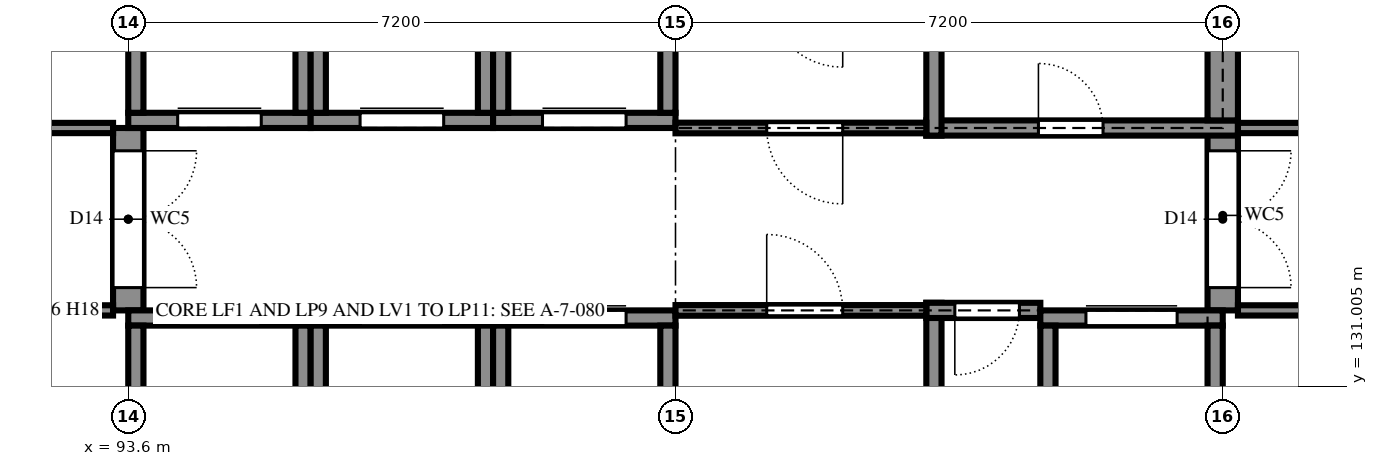
"""IFC4 building model, lengths in metres.
Left out: names, types, materials, properties, quantities, classifications, styles, units other than length and angle.
Written with IfcOpenShell. Run it as: python <this file> out.ifc"""

import sys

from ifc_helpers import new_model, si_unit, direction, frame, frame_2d, origin, place, context, subcontext, project, spatial, rectangle, extrude, element, fill, save


model = new_model("IFC4")
c1 = context("Model", 3, precision=1e-05, world=origin(), true_north=direction((0.0, 1.0)))
c2 = subcontext(c1, "Body", "Model", "MODEL_VIEW")
j1 = project(units=[si_unit("LENGTHUNIT", "METRE"), si_unit("PLANEANGLEUNIT", "RADIAN")], contexts=[c1])
p1 = place(None, origin())
s1 = spatial("IfcSite", under=j1, at=p1, CompositionType="ELEMENT")
p2 = place(p1, origin())
s2 = spatial("IfcBuilding", under=s1, at=p2, CompositionType="ELEMENT")
p3 = place(p2, frame((0.0, 0.0, 10.8)))
s3 = spatial("IfcBuildingStorey", under=s2, at=p3, CompositionType="ELEMENT", Elevation=10.8)
p4 = place(p3, frame((93.6, 132.0, 0.0), z_axis=(0.0, 0.0, 1.0), x_axis=(0.0, 1.0, 0.0)))
e1 = element("IfcWall", 1, at=p4, inside=s3, PredefinedType="SHEAR", context=c2, shape_type="SweptSolid", body=[
    extrude(rectangle(XDim=2.4, YDim=0.4, at=frame_2d((1.2, 0.0))), origin(), (0.0, 0.0, 1.0), 3.6),
])
p5 = place(p4, frame((0.3, 0.0, 0.0)))
e2 = element("IfcOpeningElement", 2, at=p5, cuts=e1, PredefinedType="OPENING", context=c2, shape_type="SweptSolid", body=[
    extrude(rectangle(XDim=1.8, YDim=2.1, at=frame_2d((0.9, 1.05))), frame((0.0, 0.21, 0.0), z_axis=(0.0, -1.0, 0.0), x_axis=(1.0, 0.0, 0.0)), (0.0, 0.0, 1.0), 0.42),
])
p6 = place(p3, frame((104.2, 132.1, 0.0), z_axis=(0.0, 0.0, 1.0), x_axis=(0.0, -1.0, 0.0)))
e3 = element("IfcWall", 3, at=p6, inside=s3, PredefinedType="SHEAR", context=c2, shape_type="SweptSolid", body=[
    extrude(rectangle(XDim=3.525, YDim=0.2, at=frame_2d((1.763, 0.0))), origin(), (0.0, 0.0, 1.0), 3.6),
])
p7 = place(p3, frame((105.6, 132.0, 0.0), z_axis=(0.0, 0.0, 1.0), x_axis=(-1.0, 0.0, 0.0)))
e4 = element("IfcWall", 4, at=p7, inside=s3, PredefinedType="SHEAR", context=c2, shape_type="SweptSolid", body=[
    extrude(rectangle(XDim=1.5, YDim=0.2, at=frame_2d((0.75, 0.0))), origin(), (0.0, 0.0, 1.0), 3.6),
])
p8 = place(p7, frame((0.275, 0.0, 0.0)))
e5 = element("IfcOpeningElement", 5, at=p8, cuts=e4, PredefinedType="OPENING", context=c2, shape_type="SweptSolid", body=[
    extrude(rectangle(XDim=0.85, YDim=2.1, at=frame_2d((0.425, 1.05))), frame((0.0, 0.11, 0.0), z_axis=(0.0, -1.0, 0.0), x_axis=(1.0, 0.0, 0.0)), (0.0, 0.0, 1.0), 0.22),
])
p9 = place(p3, frame((108.0, 132.0, 0.0), z_axis=(0.0, 0.0, 1.0), x_axis=(0.0, 1.0, 0.0)))
e6 = element("IfcWall", 6, at=p9, inside=s3, PredefinedType="SHEAR", context=c2, shape_type="SweptSolid", body=[
    extrude(rectangle(XDim=2.5, YDim=0.4, at=frame_2d((1.25, 0.0))), origin(), (0.0, 0.0, 1.0), 3.6),
])
p10 = place(p9, frame((0.3, 0.0, 0.0)))
e7 = element("IfcOpeningElement", 7, at=p10, cuts=e6, PredefinedType="OPENING", context=c2, shape_type="SweptSolid", body=[
    extrude(rectangle(XDim=1.8, YDim=2.1, at=frame_2d((0.9, 1.05))), frame((0.0, 0.21, 0.0), z_axis=(0.0, -1.0, 0.0), x_axis=(1.0, 0.0, 0.0)), (0.0, 0.0, 1.0), 0.42),
])
p11 = place(p3, frame((104.1, 134.4, 0.0), z_axis=(0.0, 0.0, 1.0), x_axis=(1.0, 0.0, 0.0)))
e8 = element("IfcWall", 8, at=p11, inside=s3, PredefinedType="SHEAR", context=c2, shape_type="SweptSolid", body=[
    extrude(rectangle(XDim=4.1, YDim=0.2, at=frame_2d((2.05, 0.0))), origin(), (0.0, 0.0, 1.0), 3.6),
])
p12 = place(p11, frame((1.475, 0.0, 0.0)))
e9 = element("IfcOpeningElement", 9, at=p12, cuts=e8, PredefinedType="OPENING", context=c2, shape_type="SweptSolid", body=[
    extrude(rectangle(XDim=0.85, YDim=2.1, at=frame_2d((0.425, 1.05))), frame((0.0, 0.11, 0.0), z_axis=(0.0, -1.0, 0.0), x_axis=(1.0, 0.0, 0.0)), (0.0, 0.0, 1.0), 0.22),
])
p13 = place(p3, frame((108.0, 134.5, 0.0), z_axis=(0.0, 0.0, 1.0), x_axis=(0.0, 1.0, 0.0)))
e10 = element("IfcWall", 10, at=p13, inside=s3, PredefinedType="SHEAR", context=c2, shape_type="SweptSolid", body=[
    extrude(rectangle(XDim=2.9, YDim=0.4, at=frame_2d((1.45, 0.0))), origin(), (0.0, 0.0, 1.0), 3.6),
])
p14 = place(p3, frame((104.2, 137.4, 0.0), z_axis=(0.0, 0.0, 1.0), x_axis=(0.0, -1.0, 0.0)))
e11 = element("IfcWall", 11, at=p14, inside=s3, PredefinedType="SHEAR", context=c2, shape_type="SweptSolid", body=[
    extrude(rectangle(XDim=3.1, YDim=0.2, at=frame_2d((1.55, 0.0))), origin(), (0.0, 0.0, 1.0), 3.6),
])
p15 = place(p3, frame((93.6, 131.9, 0.0), z_axis=(0.0, 0.0, 1.0), x_axis=(1.0, 0.0, 0.0)))
e12 = element("IfcWall", 12, at=p15, inside=s3, PredefinedType="SHEAR", context=c2, shape_type="SweptSolid", body=[
    extrude(rectangle(XDim=2.4, YDim=0.2, at=frame_2d((1.2, 0.0))), origin(), (0.0, 0.0, 1.0), 3.6),
])
p16 = place(p15, frame((0.65, 0.0, 0.0)))
e13 = element("IfcOpeningElement", 13, at=p16, cuts=e12, PredefinedType="OPENING", context=c2, shape_type="SweptSolid", body=[
    extrude(rectangle(XDim=1.1, YDim=2.1, at=frame_2d((0.55, 1.05))), frame((0.0, 0.11, 0.0), z_axis=(0.0, -1.0, 0.0), x_axis=(1.0, 0.0, 0.0)), (0.0, 0.0, 1.0), 0.22),
])
for number, where, z_axis, x_axis in (
    (14, (93.7, 129.6, 0.0), (0.0, 0.0, 1.0), (0.0, 1.0, 0.0)),
    (15, (95.9, 129.6, 0.0), (0.0, 0.0, 1.0), (0.0, 1.0, 0.0)),
):
    element("IfcWall", number, at=place(p3, frame(where, z_axis=z_axis, x_axis=x_axis)), inside=s3, PredefinedType="SHEAR", context=c2, shape_type="SweptSolid", body=[
        extrude(rectangle(XDim=2.2, YDim=0.2, at=frame_2d((1.1, 0.0))), origin(), (0.0, 0.0, 1.0), 3.6),
    ])
p17 = place(p3, frame((96.0, 131.9, 0.0), z_axis=(0.0, 0.0, 1.0), x_axis=(1.0, 0.0, 0.0)))
e16 = element("IfcWall", 16, at=p17, inside=s3, PredefinedType="SHEAR", context=c2, shape_type="SweptSolid", body=[
    extrude(rectangle(XDim=2.4, YDim=0.2, at=frame_2d((1.2, 0.0))), origin(), (0.0, 0.0, 1.0), 3.6),
])
p18 = place(p17, frame((0.65, 0.0, 0.0)))
e17 = element("IfcOpeningElement", 17, at=p18, cuts=e16, PredefinedType="OPENING", context=c2, shape_type="SweptSolid", body=[
    extrude(rectangle(XDim=1.1, YDim=2.1, at=frame_2d((0.55, 1.05))), frame((0.0, 0.11, 0.0), z_axis=(0.0, -1.0, 0.0), x_axis=(1.0, 0.0, 0.0)), (0.0, 0.0, 1.0), 0.22),
])
for number, where, z_axis, x_axis in (
    (18, (96.1, 129.6, 0.0), (0.0, 0.0, 1.0), (0.0, 1.0, 0.0)),
    (19, (98.3, 129.6, 0.0), (0.0, 0.0, 1.0), (0.0, 1.0, 0.0)),
):
    element("IfcWall", number, at=place(p3, frame(where, z_axis=z_axis, x_axis=x_axis)), inside=s3, PredefinedType="SHEAR", context=c2, shape_type="SweptSolid", body=[
        extrude(rectangle(XDim=2.2, YDim=0.2, at=frame_2d((1.1, 0.0))), origin(), (0.0, 0.0, 1.0), 3.6),
    ])
p19 = place(p3, frame((98.4, 131.9, 0.0), z_axis=(0.0, 0.0, 1.0), x_axis=(1.0, 0.0, 0.0)))
e20 = element("IfcWall", 20, at=p19, inside=s3, PredefinedType="SHEAR", context=c2, shape_type="SweptSolid", body=[
    extrude(rectangle(XDim=2.4, YDim=0.2, at=frame_2d((1.2, 0.0))), origin(), (0.0, 0.0, 1.0), 3.6),
])
p20 = place(p19, frame((0.65, 0.0, 0.0)))
e21 = element("IfcOpeningElement", 21, at=p20, cuts=e20, PredefinedType="OPENING", context=c2, shape_type="SweptSolid", body=[
    extrude(rectangle(XDim=1.1, YDim=2.1, at=frame_2d((0.55, 1.05))), frame((0.0, 0.11, 0.0), z_axis=(0.0, -1.0, 0.0), x_axis=(1.0, 0.0, 0.0)), (0.0, 0.0, 1.0), 0.22),
])
for number, where, z_axis, x_axis in (
    (22, (98.5, 129.6, 0.0), (0.0, 0.0, 1.0), (0.0, 1.0, 0.0)),
    (23, (100.7, 129.6, 0.0), (0.0, 0.0, 1.0), (0.0, 1.0, 0.0)),
):
    element("IfcWall", number, at=place(p3, frame(where, z_axis=z_axis, x_axis=x_axis)), inside=s3, PredefinedType="SHEAR", context=c2, shape_type="SweptSolid", body=[
        extrude(rectangle(XDim=2.2, YDim=0.2, at=frame_2d((1.1, 0.0))), origin(), (0.0, 0.0, 1.0), 3.6),
    ])
p21 = place(p3, frame((93.6, 134.5, 0.0), z_axis=(0.0, 0.0, 1.0), x_axis=(1.0, 0.0, 0.0)))
e24 = element("IfcWall", 24, at=p21, inside=s3, PredefinedType="SHEAR", context=c2, shape_type="SweptSolid", body=[
    extrude(rectangle(XDim=2.4, YDim=0.2, at=frame_2d((1.2, 0.0))), origin(), (0.0, 0.0, 1.0), 3.6),
])
p22 = place(p21, frame((0.65, 0.0, 0.0)))
e25 = element("IfcOpeningElement", 25, at=p22, cuts=e24, PredefinedType="OPENING", context=c2, shape_type="SweptSolid", body=[
    extrude(rectangle(XDim=1.1, YDim=2.1, at=frame_2d((0.55, 1.05))), frame((0.0, 0.11, 0.0), z_axis=(0.0, -1.0, 0.0), x_axis=(1.0, 0.0, 0.0)), (0.0, 0.0, 1.0), 0.22),
])
for number, where, z_axis, x_axis in (
    (26, (93.7, 134.6, 0.0), (0.0, 0.0, 1.0), (0.0, 1.0, 0.0)),
    (27, (95.9, 134.6, 0.0), (0.0, 0.0, 1.0), (0.0, 1.0, 0.0)),
):
    element("IfcWall", number, at=place(p3, frame(where, z_axis=z_axis, x_axis=x_axis)), inside=s3, PredefinedType="SHEAR", context=c2, shape_type="SweptSolid", body=[
        extrude(rectangle(XDim=2.2, YDim=0.2, at=frame_2d((1.1, 0.0))), origin(), (0.0, 0.0, 1.0), 3.6),
    ])
p23 = place(p3, frame((96.0, 134.5, 0.0), z_axis=(0.0, 0.0, 1.0), x_axis=(1.0, 0.0, 0.0)))
e28 = element("IfcWall", 28, at=p23, inside=s3, PredefinedType="SHEAR", context=c2, shape_type="SweptSolid", body=[
    extrude(rectangle(XDim=2.4, YDim=0.2, at=frame_2d((1.2, 0.0))), origin(), (0.0, 0.0, 1.0), 3.6),
])
p24 = place(p23, frame((0.65, 0.0, 0.0)))
e29 = element("IfcOpeningElement", 29, at=p24, cuts=e28, PredefinedType="OPENING", context=c2, shape_type="SweptSolid", body=[
    extrude(rectangle(XDim=1.1, YDim=2.1, at=frame_2d((0.55, 1.05))), frame((0.0, 0.11, 0.0), z_axis=(0.0, -1.0, 0.0), x_axis=(1.0, 0.0, 0.0)), (0.0, 0.0, 1.0), 0.22),
])
for number, where, z_axis, x_axis in (
    (30, (96.1, 134.6, 0.0), (0.0, 0.0, 1.0), (0.0, 1.0, 0.0)),
    (31, (98.3, 134.6, 0.0), (0.0, 0.0, 1.0), (0.0, 1.0, 0.0)),
):
    element("IfcWall", number, at=place(p3, frame(where, z_axis=z_axis, x_axis=x_axis)), inside=s3, PredefinedType="SHEAR", context=c2, shape_type="SweptSolid", body=[
        extrude(rectangle(XDim=2.2, YDim=0.2, at=frame_2d((1.1, 0.0))), origin(), (0.0, 0.0, 1.0), 3.6),
    ])
p25 = place(p3, frame((98.4, 134.5, 0.0), z_axis=(0.0, 0.0, 1.0), x_axis=(1.0, 0.0, 0.0)))
e32 = element("IfcWall", 32, at=p25, inside=s3, PredefinedType="SHEAR", context=c2, shape_type="SweptSolid", body=[
    extrude(rectangle(XDim=2.4, YDim=0.2, at=frame_2d((1.2, 0.0))), origin(), (0.0, 0.0, 1.0), 3.6),
])
p26 = place(p25, frame((0.65, 0.0, 0.0)))
e33 = element("IfcOpeningElement", 33, at=p26, cuts=e32, PredefinedType="OPENING", context=c2, shape_type="SweptSolid", body=[
    extrude(rectangle(XDim=1.1, YDim=2.1, at=frame_2d((0.55, 1.05))), frame((0.0, 0.11, 0.0), z_axis=(0.0, -1.0, 0.0), x_axis=(1.0, 0.0, 0.0)), (0.0, 0.0, 1.0), 0.22),
])
for number, where, z_axis, x_axis in (
    (34, (98.5, 134.6, 0.0), (0.0, 0.0, 1.0), (0.0, 1.0, 0.0)),
    (35, (100.7, 134.6, 0.0), (0.0, 0.0, 1.0), (0.0, 1.0, 0.0)),
):
    element("IfcWall", number, at=place(p3, frame(where, z_axis=z_axis, x_axis=x_axis)), inside=s3, PredefinedType="SHEAR", context=c2, shape_type="SweptSolid", body=[
        extrude(rectangle(XDim=2.2, YDim=0.2, at=frame_2d((1.1, 0.0))), origin(), (0.0, 0.0, 1.0), 3.6),
    ])
p27 = place(p3, frame((105.6, 131.9, 0.0), z_axis=(0.0, 0.0, 1.0), x_axis=(1.0, 0.0, 0.0)))
e36 = element("IfcWall", 36, at=p27, inside=s3, PredefinedType="SHEAR", context=c2, shape_type="SweptSolid", body=[
    extrude(rectangle(XDim=2.4, YDim=0.2, at=frame_2d((1.2, 0.0))), origin(), (0.0, 0.0, 1.0), 3.6),
])
p28 = place(p27, frame((0.6, 0.0, 0.0)))
e37 = element("IfcOpeningElement", 37, at=p28, cuts=e36, PredefinedType="OPENING", context=c2, shape_type="SweptSolid", body=[
    extrude(rectangle(XDim=1.2, YDim=2.1, at=frame_2d((0.6, 1.05))), frame((0.0, 0.11, 0.0), z_axis=(0.0, -1.0, 0.0), x_axis=(1.0, 0.0, 0.0)), (0.0, 0.0, 1.0), 0.22),
])
for number, where, z_axis, x_axis in (
    (38, (105.7, 129.3, 0.0), (0.0, 0.0, 1.0), (0.0, 1.0, 0.0)),
    (39, (107.9, 129.3, 0.0), (0.0, 0.0, 1.0), (0.0, 1.0, 0.0)),
):
    element("IfcWall", number, at=place(p3, frame(where, z_axis=z_axis, x_axis=x_axis)), inside=s3, PredefinedType="SHEAR", context=c2, shape_type="SweptSolid", body=[
        extrude(rectangle(XDim=2.5, YDim=0.2, at=frame_2d((1.25, 0.0))), origin(), (0.0, 0.0, 1.0), 3.6),
    ])
p29 = place(p3, frame((92.143, 132.0, 0.0), z_axis=(0.0, 0.0, 1.0), x_axis=(1.0, 0.0, 0.0)))
e40 = element("IfcWall", 40, at=p29, inside=s3, PredefinedType="PARTITIONING", context=c2, shape_type="SweptSolid", body=[
    extrude(rectangle(XDim=1.257, YDim=0.135, at=frame_2d((0.629, 0.0))), origin(), (0.0, 0.0, 1.0), 3.159),
])
p30 = place(p3, frame((100.8, 132.0, 0.0), z_axis=(0.0, 0.0, 1.0), x_axis=(1.0, 0.0, 0.0)))
e41 = element("IfcWall", 41, at=p30, inside=s3, PredefinedType="PARTITIONING", context=c2, shape_type="SweptSolid", body=[
    extrude(rectangle(XDim=3.3, YDim=0.14, at=frame_2d((1.65, 0.0))), origin(), (0.0, 0.0, 1.0), 3.42),
])
p31 = place(p30, frame((1.2, 0.0, 0.0)))
e42 = element("IfcOpeningElement", 42, at=p31, cuts=e41, PredefinedType="OPENING", context=c2, shape_type="SweptSolid", body=[
    extrude(rectangle(XDim=1.0, YDim=2.1, at=frame_2d((0.5, 1.05))), frame((0.0, 0.08, 0.0), z_axis=(0.0, -1.0, 0.0), x_axis=(1.0, 0.0, 0.0)), (0.0, 0.0, 1.0), 0.16),
])
p32 = place(p3, frame((108.2, 132.0, 0.0), z_axis=(0.0, 0.0, 1.0), x_axis=(1.0, 0.0, 0.0)))
e43 = element("IfcWall", 43, at=p32, inside=s3, PredefinedType="PARTITIONING", context=c2, shape_type="SweptSolid", body=[
    extrude(rectangle(XDim=28.41, YDim=0.135, at=frame_2d((14.205, 0.0))), origin(), (0.0, 0.0, 1.0), 3.159),
])
p33 = place(p32, frame((26.375, 0.0, 0.0)))
e44 = element("IfcOpeningElement", 44, at=p33, cuts=e43, PredefinedType="OPENING", context=c2, shape_type="SweptSolid", body=[
    extrude(rectangle(XDim=0.85, YDim=2.1, at=frame_2d((0.425, 1.05))), frame((0.0, 0.077, 0.0), z_axis=(0.0, -1.0, 0.0), x_axis=(1.0, 0.0, 0.0)), (0.0, 0.0, 1.0), 0.155),
])
p34 = place(p32, frame((2.9, 0.0, 0.0)))
e45 = element("IfcOpeningElement", 45, at=p34, cuts=e43, PredefinedType="OPENING", context=c2, shape_type="SweptSolid", body=[
    extrude(rectangle(XDim=1.0, YDim=2.4, at=frame_2d((0.5, 1.2))), frame((0.0, 0.077, 0.0), z_axis=(0.0, -1.0, 0.0), x_axis=(1.0, 0.0, 0.0)), (0.0, 0.0, 1.0), 0.155),
])
p35 = place(p32, frame((10.1, 0.0, 0.0)))
e46 = element("IfcOpeningElement", 46, at=p35, cuts=e43, PredefinedType="OPENING", context=c2, shape_type="SweptSolid", body=[
    extrude(rectangle(XDim=1.0, YDim=2.4, at=frame_2d((0.5, 1.2))), frame((0.0, 0.077, 0.0), z_axis=(0.0, -1.0, 0.0), x_axis=(1.0, 0.0, 0.0)), (0.0, 0.0, 1.0), 0.155),
])
p36 = place(p32, frame((19.1, 0.0, 0.0)))
e47 = element("IfcOpeningElement", 47, at=p36, cuts=e43, PredefinedType="OPENING", context=c2, shape_type="SweptSolid", body=[
    extrude(rectangle(XDim=1.0, YDim=2.4, at=frame_2d((0.5, 1.2))), frame((0.0, 0.077, 0.0), z_axis=(0.0, -1.0, 0.0), x_axis=(1.0, 0.0, 0.0)), (0.0, 0.0, 1.0), 0.155),
])
p37 = place(p3, frame((86.312, 134.4, 0.0), z_axis=(0.0, 0.0, 1.0), x_axis=(1.0, 0.0, 0.0)))
e48 = element("IfcWall", 48, at=p37, inside=s3, PredefinedType="PARTITIONING", context=c2, shape_type="SweptSolid", body=[
    extrude(rectangle(XDim=7.087, YDim=0.135, at=frame_2d((3.544, 0.0))), origin(), (0.0, 0.0, 1.0), 3.159),
])
p38 = place(p37, frame((3.188, 0.0, 0.0)))
e49 = element("IfcOpeningElement", 49, at=p38, cuts=e48, PredefinedType="OPENING", context=c2, shape_type="SweptSolid", body=[
    extrude(rectangle(XDim=1.0, YDim=2.4, at=frame_2d((0.5, 1.2))), frame((0.0, 0.077, 0.0), z_axis=(0.0, -1.0, 0.0), x_axis=(1.0, 0.0, 0.0)), (0.0, 0.0, 1.0), 0.155),
])
p39 = place(p3, frame((100.8, 134.4, 0.0), z_axis=(0.0, 0.0, 1.0), x_axis=(1.0, 0.0, 0.0)))
e50 = element("IfcWall", 50, at=p39, inside=s3, PredefinedType="PARTITIONING", context=c2, shape_type="SweptSolid", body=[
    extrude(rectangle(XDim=3.3, YDim=0.14, at=frame_2d((1.65, 0.0))), origin(), (0.0, 0.0, 1.0), 3.42),
])
p40 = place(p39, frame((1.2, 0.0, 0.0)))
e51 = element("IfcOpeningElement", 51, at=p40, cuts=e50, PredefinedType="OPENING", context=c2, shape_type="SweptSolid", body=[
    extrude(rectangle(XDim=1.0, YDim=2.1, at=frame_2d((0.5, 1.05))), frame((0.0, 0.08, 0.0), z_axis=(0.0, -1.0, 0.0), x_axis=(1.0, 0.0, 0.0)), (0.0, 0.0, 1.0), 0.16),
])
p41 = place(p3, frame((108.2, 134.4, 0.0), z_axis=(0.0, 0.0, 1.0), x_axis=(1.0, 0.0, 0.0)))
e52 = element("IfcWall", 52, at=p41, inside=s3, PredefinedType="PARTITIONING", context=c2, shape_type="SweptSolid", body=[
    extrude(rectangle(XDim=25.07, YDim=0.135, at=frame_2d((12.535, 0.0))), origin(), (0.0, 0.0, 1.0), 3.159),
])
p42 = place(p41, frame((4.6, 0.0, 0.0)))
e53 = element("IfcOpeningElement", 53, at=p42, cuts=e52, PredefinedType="OPENING", context=c2, shape_type="SweptSolid", body=[
    extrude(rectangle(XDim=1.8, YDim=2.1, at=frame_2d((0.9, 1.05))), frame((0.0, 0.077, 0.0), z_axis=(0.0, -1.0, 0.0), x_axis=(1.0, 0.0, 0.0)), (0.0, 0.0, 1.0), 0.155),
])
p43 = place(p41, frame((17.8, 0.0, 0.0)))
e54 = element("IfcOpeningElement", 54, at=p43, cuts=e52, PredefinedType="OPENING", context=c2, shape_type="SweptSolid", body=[
    extrude(rectangle(XDim=1.8, YDim=2.1, at=frame_2d((0.9, 1.05))), frame((0.0, 0.077, 0.0), z_axis=(0.0, -1.0, 0.0), x_axis=(1.0, 0.0, 0.0)), (0.0, 0.0, 1.0), 0.155),
])
p44 = place(p16, origin())
e55 = element("IfcDoor", 55, at=p44, inside=s3, OperationType="SLIDING_TO_LEFT", PredefinedType="DOOR", context=c2, shape_type="SweptSolid", body=[
    extrude(rectangle(XDim=1.1, YDim=2.1, at=frame_2d((0.55, 1.05))), frame((0.0, 0.025, 0.0), z_axis=(0.0, -1.0, 0.0), x_axis=(1.0, 0.0, 0.0)), (0.0, 0.0, 1.0), 0.05),
])
fill(e13, e55)
p45 = place(p18, origin())
e56 = element("IfcDoor", 56, at=p45, inside=s3, OperationType="SLIDING_TO_LEFT", PredefinedType="DOOR", context=c2, shape_type="SweptSolid", body=[
    extrude(rectangle(XDim=1.1, YDim=2.1, at=frame_2d((0.55, 1.05))), frame((0.0, 0.025, 0.0), z_axis=(0.0, -1.0, 0.0), x_axis=(1.0, 0.0, 0.0)), (0.0, 0.0, 1.0), 0.05),
])
fill(e17, e56)
p46 = place(p20, origin())
e57 = element("IfcDoor", 57, at=p46, inside=s3, OperationType="SLIDING_TO_LEFT", PredefinedType="DOOR", context=c2, shape_type="SweptSolid", body=[
    extrude(rectangle(XDim=1.1, YDim=2.1, at=frame_2d((0.55, 1.05))), frame((0.0, 0.025, 0.0), z_axis=(0.0, -1.0, 0.0), x_axis=(1.0, 0.0, 0.0)), (0.0, 0.0, 1.0), 0.05),
])
fill(e21, e57)
p47 = place(p22, origin())
e58 = element("IfcDoor", 58, at=p47, inside=s3, OperationType="SLIDING_TO_LEFT", PredefinedType="DOOR", context=c2, shape_type="SweptSolid", body=[
    extrude(rectangle(XDim=1.1, YDim=2.1, at=frame_2d((0.55, 1.05))), frame((0.0, 0.025, 0.0), z_axis=(0.0, -1.0, 0.0), x_axis=(1.0, 0.0, 0.0)), (0.0, 0.0, 1.0), 0.05),
])
fill(e25, e58)
p48 = place(p24, origin())
e59 = element("IfcDoor", 59, at=p48, inside=s3, OperationType="SLIDING_TO_LEFT", PredefinedType="DOOR", context=c2, shape_type="SweptSolid", body=[
    extrude(rectangle(XDim=1.1, YDim=2.1, at=frame_2d((0.55, 1.05))), frame((0.0, 0.025, 0.0), z_axis=(0.0, -1.0, 0.0), x_axis=(1.0, 0.0, 0.0)), (0.0, 0.0, 1.0), 0.05),
])
fill(e29, e59)
p49 = place(p26, origin())
e60 = element("IfcDoor", 60, at=p49, inside=s3, OperationType="SLIDING_TO_LEFT", PredefinedType="DOOR", context=c2, shape_type="SweptSolid", body=[
    extrude(rectangle(XDim=1.1, YDim=2.1, at=frame_2d((0.55, 1.05))), frame((0.0, 0.025, 0.0), z_axis=(0.0, -1.0, 0.0), x_axis=(1.0, 0.0, 0.0)), (0.0, 0.0, 1.0), 0.05),
])
fill(e33, e60)
p50 = place(p28, origin())
e61 = element("IfcDoor", 61, at=p50, inside=s3, OperationType="SLIDING_TO_LEFT", PredefinedType="DOOR", context=c2, shape_type="SweptSolid", body=[
    extrude(rectangle(XDim=1.2, YDim=2.1, at=frame_2d((0.6, 1.05))), frame((0.0, 0.025, 0.0), z_axis=(0.0, -1.0, 0.0), x_axis=(1.0, 0.0, 0.0)), (0.0, 0.0, 1.0), 0.05),
])
fill(e37, e61)
p51 = place(p31, origin())
e62 = element("IfcDoor", 62, at=p51, inside=s3, OperationType="SINGLE_SWING_RIGHT", PredefinedType="DOOR", context=c2, shape_type="SweptSolid", body=[
    extrude(rectangle(XDim=1.0, YDim=2.1, at=frame_2d((0.5, 1.05))), frame((0.0, 0.025, 0.0), z_axis=(0.0, -1.0, 0.0), x_axis=(1.0, 0.0, 0.0)), (0.0, 0.0, 1.0), 0.05),
])
fill(e42, e62)
p52 = place(p40, frame((1.0, 0.0, 0.0), z_axis=(0.0, 0.0, 1.0), x_axis=(-1.0, 0.0, 0.0)))
e63 = element("IfcDoor", 63, at=p52, inside=s3, OperationType="SINGLE_SWING_RIGHT", PredefinedType="DOOR", context=c2, shape_type="SweptSolid", body=[
    extrude(rectangle(XDim=1.0, YDim=2.1, at=frame_2d((0.5, 1.05))), frame((0.0, 0.025, 0.0), z_axis=(0.0, -1.0, 0.0), x_axis=(1.0, 0.0, 0.0)), (0.0, 0.0, 1.0), 0.05),
])
fill(e51, e63)
p53 = place(p8, origin())
e64 = element("IfcDoor", 64, at=p53, inside=s3, OperationType="SINGLE_SWING_LEFT", PredefinedType="DOOR", context=c2, shape_type="SweptSolid", body=[
    extrude(rectangle(XDim=0.85, YDim=2.1, at=frame_2d((0.425, 1.05))), frame((0.0, 0.025, 0.0), z_axis=(0.0, -1.0, 0.0), x_axis=(1.0, 0.0, 0.0)), (0.0, 0.0, 1.0), 0.05),
])
fill(e5, e64)
p54 = place(p12, origin())
e65 = element("IfcDoor", 65, at=p54, inside=s3, OperationType="SINGLE_SWING_RIGHT", PredefinedType="DOOR", context=c2, shape_type="SweptSolid", body=[
    extrude(rectangle(XDim=0.85, YDim=2.1, at=frame_2d((0.425, 1.05))), frame((0.0, 0.025, 0.0), z_axis=(0.0, -1.0, 0.0), x_axis=(1.0, 0.0, 0.0)), (0.0, 0.0, 1.0), 0.05),
])
fill(e9, e65)
p55 = place(p5, frame((1.8, 0.0, 0.0), z_axis=(0.0, 0.0, 1.0), x_axis=(-1.0, 0.0, 0.0)))
e66 = element("IfcDoor", 66, at=p55, inside=s3, OperationType="DOUBLE_DOOR_SINGLE_SWING", PredefinedType="DOOR", context=c2, shape_type="SweptSolid", body=[
    extrude(rectangle(XDim=1.8, YDim=2.1, at=frame_2d((0.9, 1.05))), frame((0.0, 0.025, 0.0), z_axis=(0.0, -1.0, 0.0), x_axis=(1.0, 0.0, 0.0)), (0.0, 0.0, 1.0), 0.05),
])
fill(e2, e66)
p56 = place(p10, frame((1.8, 0.0, 0.0), z_axis=(0.0, 0.0, 1.0), x_axis=(-1.0, 0.0, 0.0)))
e67 = element("IfcDoor", 67, at=p56, inside=s3, OperationType="DOUBLE_DOOR_SINGLE_SWING", PredefinedType="DOOR", context=c2, shape_type="SweptSolid", body=[
    extrude(rectangle(XDim=1.8, YDim=2.1, at=frame_2d((0.9, 1.05))), frame((0.0, 0.025, 0.0), z_axis=(0.0, -1.0, 0.0), x_axis=(1.0, 0.0, 0.0)), (0.0, 0.0, 1.0), 0.05),
])
fill(e7, e67)
save(model, sys.argv[1])
